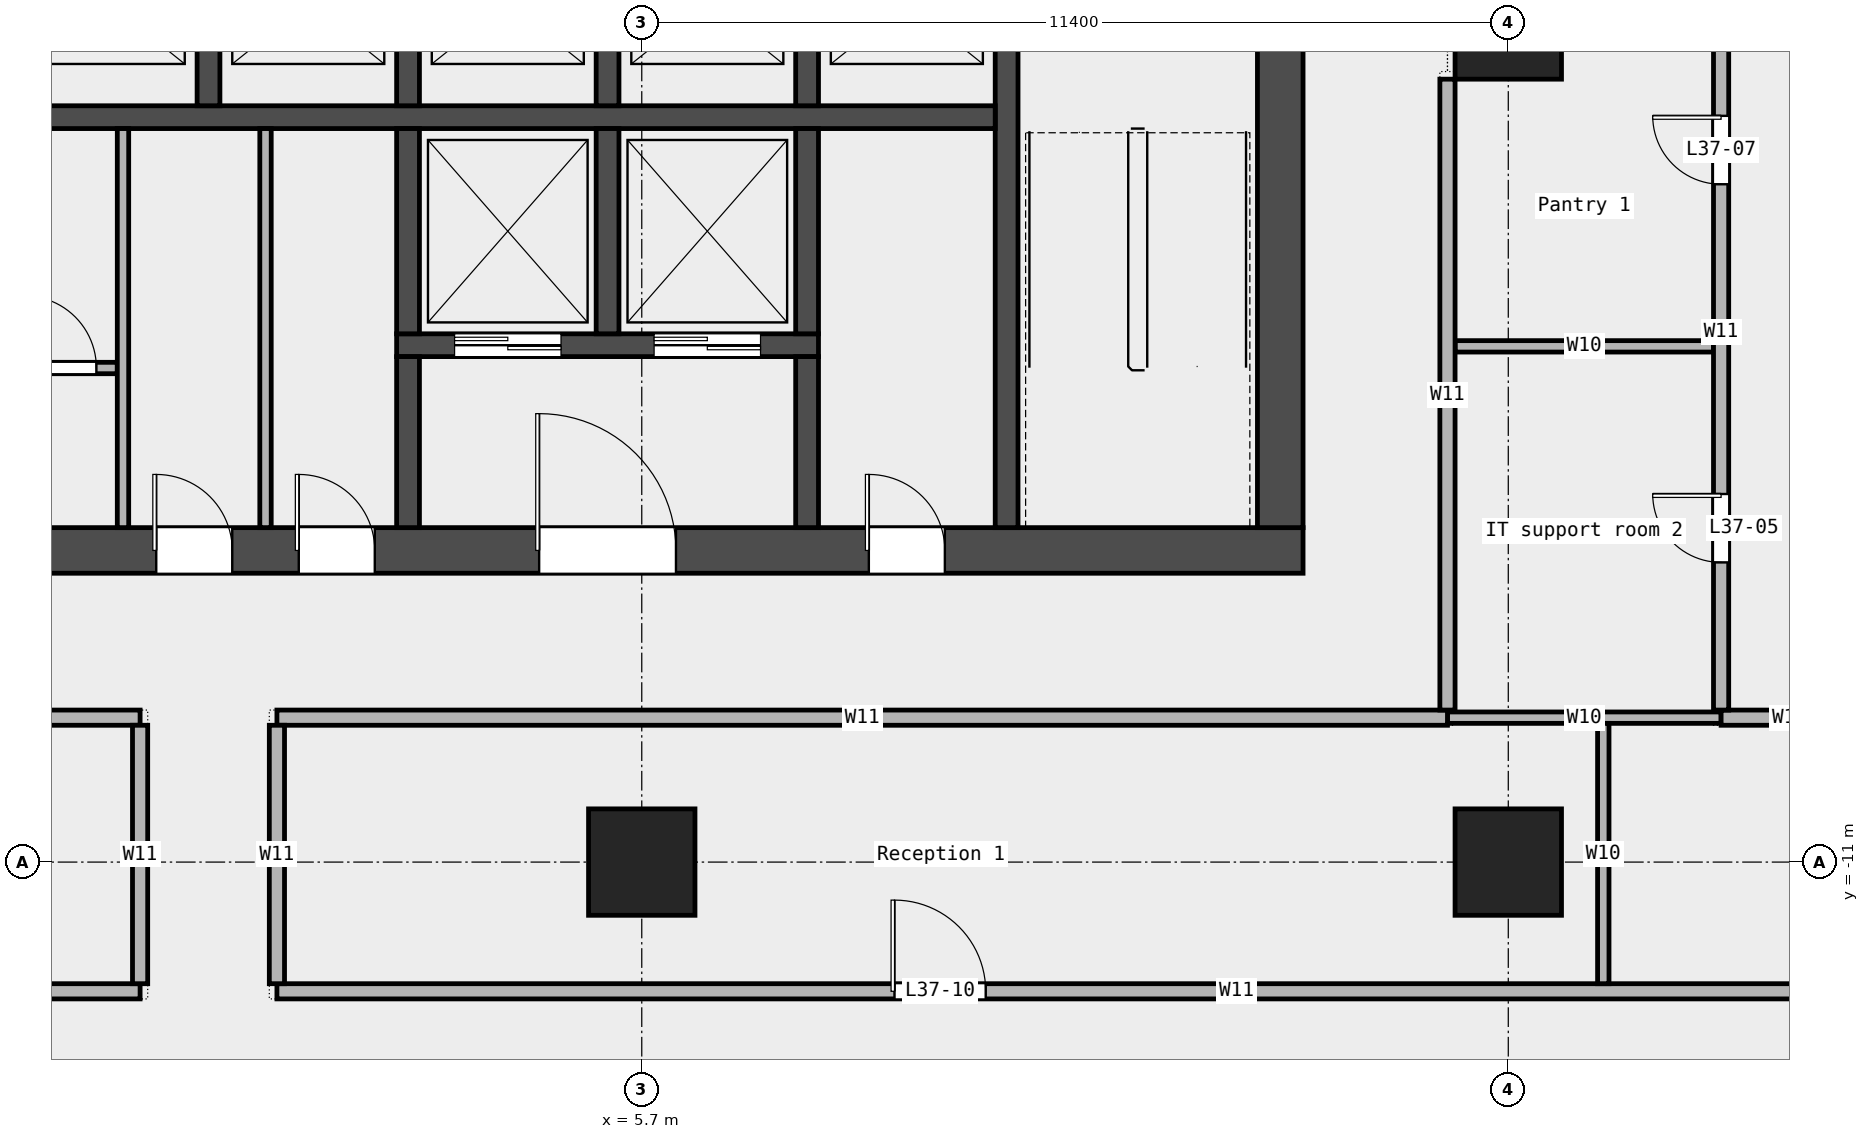
"""IFC4 building model, lengths in metres.
Left out: names, types, materials, properties, quantities, classifications, styles, units other than length and angle.
Written with IfcOpenShell. Run it as: python <this file> out.ifc"""

import sys

from ifc_helpers import new_model, si_unit, direction, frame, frame_2d, origin, origin_2d, place, context, subcontext, project, spatial, rectangle, extrude, element, fill, save


model = new_model("IFC4")
c1 = context("Model", 3, precision=1e-05, world=origin(), true_north=direction((0.0, 1.0)))
c2 = subcontext(c1, "Body", "Model", "MODEL_VIEW")
j1 = project(units=[si_unit("LENGTHUNIT", "METRE"), si_unit("PLANEANGLEUNIT", "RADIAN")], contexts=[c1])
p1 = place(None, origin())
s1 = spatial("IfcSite", under=j1, at=p1, CompositionType="ELEMENT")
p2 = place(p1, origin())
s2 = spatial("IfcBuilding", under=s1, at=p2, CompositionType="ELEMENT")
p3 = place(p2, frame((0.0, 0.0, 181.0)))
s3 = spatial("IfcBuildingStorey", under=s2, at=p3, CompositionType="ELEMENT", Elevation=181.0)
for number, where, z_axis, x_axis in (
    (1, (5.7, -11.0, 0.0), (0.0, 0.0, 1.0), (1.0, 0.0, 0.0)),
    (2, (17.1, -11.0, 0.0), (0.0, 0.0, 1.0), (1.0, 0.0, 0.0)),
    (3, (17.1, 0.0, 0.0), (0.0, 0.0, 1.0), (1.0, 0.0, 0.0)),
):
    element("IfcColumn", number, at=place(p3, frame(where, z_axis=z_axis, x_axis=x_axis)), inside=s3, PredefinedType="COLUMN", context=c2, shape_type="SweptSolid", body=[
        extrude(rectangle(XDim=1.4, YDim=1.4, at=origin_2d()), origin(), (0.0, 0.0, 1.0), 3.6),
    ])
p4 = place(p3, frame((-24.15, -12.7, 0.0), z_axis=(0.0, 0.0, 1.0), x_axis=(1.0, 0.0, 0.0)))
e4 = element("IfcWall", 4, at=p4, inside=s3, PredefinedType="PARTITIONING", context=c2, shape_type="SweptSolid", body=[
    extrude(rectangle(XDim=23.25, YDim=0.2, at=frame_2d((11.625, 0.0))), origin(), (0.0, 0.0, 1.0), 3.6),
])
p5 = place(p4, frame((19.35, 0.0, 0.0)))
e5 = element("IfcOpeningElement", 5, at=p5, cuts=e4, PredefinedType="OPENING", context=c2, shape_type="SweptSolid", body=[
    extrude(rectangle(XDim=0.9, YDim=2.1, at=frame_2d((0.45, 1.05))), frame((0.0, 0.112, 0.0), z_axis=(0.0, -1.0, 0.0), x_axis=(1.0, 0.0, 0.0)), (0.0, 0.0, 1.0), 0.224),
])
p6 = place(p4, frame((7.825, 0.0, 0.0)))
e6 = element("IfcOpeningElement", 6, at=p6, cuts=e4, PredefinedType="OPENING", context=c2, shape_type="SweptSolid", body=[
    extrude(rectangle(XDim=1.5, YDim=2.1, at=frame_2d((0.75, 1.05))), frame((0.0, 0.112, 0.0), z_axis=(0.0, -1.0, 0.0), x_axis=(1.0, 0.0, 0.0)), (0.0, 0.0, 1.0), 0.224),
])
p7 = place(p3, frame((0.9, -12.7, 0.0), z_axis=(0.0, 0.0, 1.0), x_axis=(1.0, 0.0, 0.0)))
e7 = element("IfcWall", 7, at=p7, inside=s3, PredefinedType="PARTITIONING", context=c2, shape_type="SweptSolid", body=[
    extrude(rectangle(XDim=25.25, YDim=0.2, at=frame_2d((12.625, 0.0))), origin(), (0.0, 0.0, 1.0), 3.6),
])
p8 = place(p7, frame((20.75, 0.0, 0.0)))
e8 = element("IfcOpeningElement", 8, at=p8, cuts=e7, PredefinedType="OPENING", context=c2, shape_type="SweptSolid", body=[
    extrude(rectangle(XDim=1.0, YDim=2.1, at=frame_2d((0.5, 1.05))), frame((0.0, 0.112, 0.0), z_axis=(0.0, -1.0, 0.0), x_axis=(1.0, 0.0, 0.0)), (0.0, 0.0, 1.0), 0.224),
])
p9 = place(p7, frame((8.125, 0.0, 0.0)))
e9 = element("IfcOpeningElement", 9, at=p9, cuts=e7, PredefinedType="OPENING", context=c2, shape_type="SweptSolid", body=[
    extrude(rectangle(XDim=1.2, YDim=2.1, at=frame_2d((0.6, 1.05))), frame((0.0, 0.112, 0.0), z_axis=(0.0, -1.0, 0.0), x_axis=(1.0, 0.0, 0.0)), (0.0, 0.0, 1.0), 0.224),
])
p10 = place(p3, frame((16.3, -9.1, 0.0), z_axis=(0.0, 0.0, 1.0), x_axis=(1.0, 0.0, 0.0)))
e10 = element("IfcWall", 10, at=p10, inside=s3, PredefinedType="PARTITIONING", context=c2, shape_type="SweptSolid", body=[
    extrude(rectangle(XDim=3.6, YDim=0.15, at=frame_2d((1.8, 0.0))), origin(), (0.0, 0.0, 1.0), 3.6),
])
for number, where, z_axis, x_axis in (
    (11, (-16.3, -9.1, 0.0), (0.0, 0.0, 1.0), (1.0, 0.0, 0.0)),
    (12, (0.9, -9.1, 0.0), (0.0, 0.0, 1.0), (1.0, 0.0, 0.0)),
):
    element("IfcWall", number, at=place(p3, frame(where, z_axis=z_axis, x_axis=x_axis)), inside=s3, PredefinedType="PARTITIONING", context=c2, shape_type="SweptSolid", body=[
        extrude(rectangle(XDim=15.4, YDim=0.2, at=frame_2d((7.7, 0.0))), origin(), (0.0, 0.0, 1.0), 3.6),
    ])
p11 = place(p3, frame((19.9, -9.1, 0.0), z_axis=(0.0, 0.0, 1.0), x_axis=(1.0, 0.0, 0.0)))
e13 = element("IfcWall", 13, at=p11, inside=s3, PredefinedType="PARTITIONING", context=c2, shape_type="SweptSolid", body=[
    extrude(rectangle(XDim=1.8, YDim=0.2, at=frame_2d((0.9, 0.0))), origin(), (0.0, 0.0, 1.0), 3.6),
])
p12 = place(p3, frame((16.4, -4.215, 0.0), z_axis=(0.0, 0.0, 1.0), x_axis=(1.0, 0.0, 0.0)))
e14 = element("IfcWall", 14, at=p12, inside=s3, PredefinedType="PARTITIONING", context=c2, shape_type="SweptSolid", body=[
    extrude(rectangle(XDim=3.4, YDim=0.15, at=frame_2d((1.7, 0.0))), origin(), (0.0, 0.0, 1.0), 3.6),
])
for number, where, z_axis, x_axis in (
    (15, (-0.9, -12.6, 0.0), (0.0, 0.0, 1.0), (0.0, 1.0, 0.0)),
    (16, (0.9, -12.6, 0.0), (0.0, 0.0, 1.0), (0.0, 1.0, 0.0)),
):
    element("IfcWall", number, at=place(p3, frame(where, z_axis=z_axis, x_axis=x_axis)), inside=s3, PredefinedType="PARTITIONING", context=c2, shape_type="SweptSolid", body=[
        extrude(rectangle(XDim=3.4, YDim=0.2, at=frame_2d((1.7, 0.0))), origin(), (0.0, 0.0, 1.0), 3.6),
    ])
p13 = place(p3, frame((16.3, -9.0, 0.0), z_axis=(0.0, 0.0, 1.0), x_axis=(0.0, 1.0, 0.0)))
e17 = element("IfcWall", 17, at=p13, inside=s3, PredefinedType="PARTITIONING", context=c2, shape_type="SweptSolid", body=[
    extrude(rectangle(XDim=8.3, YDim=0.2, at=frame_2d((4.15, 0.0))), origin(), (0.0, 0.0, 1.0), 3.6),
])
p14 = place(p3, frame((18.35, -12.6, 0.0), z_axis=(0.0, 0.0, 1.0), x_axis=(0.0, 1.0, 0.0)))
e18 = element("IfcWall", 18, at=p14, inside=s3, PredefinedType="PARTITIONING", context=c2, shape_type="SweptSolid", body=[
    extrude(rectangle(XDim=3.425, YDim=0.15, at=frame_2d((1.712, 0.0))), origin(), (0.0, 0.0, 1.0), 3.6),
])
p15 = place(p3, frame((19.9, -9.0, 0.0), z_axis=(0.0, 0.0, 1.0), x_axis=(0.0, 1.0, 0.0)))
e19 = element("IfcWall", 19, at=p15, inside=s3, PredefinedType="PARTITIONING", context=c2, shape_type="SweptSolid", body=[
    extrude(rectangle(XDim=9.95, YDim=0.2, at=frame_2d((4.975, 0.0))), origin(), (0.0, 0.0, 1.0), 3.6),
])
p16 = place(p15, frame((1.942, 0.0, 0.0)))
e20 = element("IfcOpeningElement", 20, at=p16, cuts=e19, PredefinedType="OPENING", context=c2, shape_type="SweptSolid", body=[
    extrude(rectangle(XDim=0.9, YDim=2.1, at=frame_2d((0.45, 1.05))), frame((0.0, 0.112, 0.0), z_axis=(0.0, -1.0, 0.0), x_axis=(1.0, 0.0, 0.0)), (0.0, 0.0, 1.0), 0.224),
])
p17 = place(p15, frame((6.917, 0.0, 0.0)))
e21 = element("IfcOpeningElement", 21, at=p17, cuts=e19, PredefinedType="OPENING", context=c2, shape_type="SweptSolid", body=[
    extrude(rectangle(XDim=0.9, YDim=2.1, at=frame_2d((0.45, 1.05))), frame((0.0, 0.112, 0.0), z_axis=(0.0, -1.0, 0.0), x_axis=(1.0, 0.0, 0.0)), (0.0, 0.0, 1.0), 0.224),
])
p18 = place(p3, frame((-14.4, -6.9, 0.0), z_axis=(0.0, 0.0, 1.0), x_axis=(1.0, 0.0, 0.0)))
e22 = element("IfcWall", 22, at=p18, inside=s3, PredefinedType="SHEAR", context=c2, shape_type="SweptSolid", body=[
    extrude(rectangle(XDim=28.8, YDim=0.6, at=frame_2d((14.4, 0.0))), origin(), (0.0, 0.0, 1.0), 3.7),
])
p19 = place(p18, frame((4.337, 0.0, 0.0)))
e23 = element("IfcOpeningElement", 23, at=p19, cuts=e22, PredefinedType="OPENING", context=c2, shape_type="SweptSolid", body=[
    extrude(rectangle(XDim=1.0, YDim=2.1, at=frame_2d((0.5, 1.05))), frame((0.0, 0.312, 0.0), z_axis=(0.0, -1.0, 0.0), x_axis=(1.0, 0.0, 0.0)), (0.0, 0.0, 1.0), 0.624),
])
p20 = place(p18, frame((8.925, 0.0, 0.0)))
e24 = element("IfcOpeningElement", 24, at=p20, cuts=e22, PredefinedType="OPENING", context=c2, shape_type="SweptSolid", body=[
    extrude(rectangle(XDim=1.2, YDim=2.1, at=frame_2d((0.6, 1.05))), frame((0.0, 0.312, 0.0), z_axis=(0.0, -1.0, 0.0), x_axis=(1.0, 0.0, 0.0)), (0.0, 0.0, 1.0), 0.624),
])
p21 = place(p18, frame((13.712, 0.0, 0.0)))
e25 = element("IfcOpeningElement", 25, at=p21, cuts=e22, PredefinedType="OPENING", context=c2, shape_type="SweptSolid", body=[
    extrude(rectangle(XDim=1.0, YDim=2.1, at=frame_2d((0.5, 1.05))), frame((0.0, 0.312, 0.0), z_axis=(0.0, -1.0, 0.0), x_axis=(1.0, 0.0, 0.0)), (0.0, 0.0, 1.0), 0.624),
])
p22 = place(p18, frame((15.587, 0.0, 0.0)))
e26 = element("IfcOpeningElement", 26, at=p22, cuts=e22, PredefinedType="OPENING", context=c2, shape_type="SweptSolid", body=[
    extrude(rectangle(XDim=1.0, YDim=2.1, at=frame_2d((0.5, 1.05))), frame((0.0, 0.312, 0.0), z_axis=(0.0, -1.0, 0.0), x_axis=(1.0, 0.0, 0.0)), (0.0, 0.0, 1.0), 0.624),
])
p23 = place(p18, frame((18.75, 0.0, 0.0)))
e27 = element("IfcOpeningElement", 27, at=p23, cuts=e22, PredefinedType="OPENING", context=c2, shape_type="SweptSolid", body=[
    extrude(rectangle(XDim=1.8, YDim=2.1, at=frame_2d((0.9, 1.05))), frame((0.0, 0.312, 0.0), z_axis=(0.0, -1.0, 0.0), x_axis=(1.0, 0.0, 0.0)), (0.0, 0.0, 1.0), 0.624),
])
p24 = place(p18, frame((23.087, 0.0, 0.0)))
e28 = element("IfcOpeningElement", 28, at=p24, cuts=e22, PredefinedType="OPENING", context=c2, shape_type="SweptSolid", body=[
    extrude(rectangle(XDim=1.0, YDim=2.1, at=frame_2d((0.5, 1.05))), frame((0.0, 0.312, 0.0), z_axis=(0.0, -1.0, 0.0), x_axis=(1.0, 0.0, 0.0)), (0.0, 0.0, 1.0), 0.624),
])
p25 = place(p3, frame((14.1, -6.6, 0.0), z_axis=(0.0, 0.0, 1.0), x_axis=(0.0, 1.0, 0.0)))
e29 = element("IfcWall", 29, at=p25, inside=s3, PredefinedType="SHEAR", context=c2, shape_type="SweptSolid", body=[
    extrude(rectangle(XDim=19.5, YDim=0.6, at=frame_2d((9.75, 0.0))), origin(), (0.0, 0.0, 1.0), 3.7),
])
p26 = place(p25, frame((9.3, 0.0, 0.0)))
e30 = element("IfcOpeningElement", 30, at=p26, cuts=e29, PredefinedType="OPENING", context=c2, shape_type="SweptSolid", body=[
    extrude(rectangle(XDim=1.8, YDim=2.1, at=frame_2d((0.9, 1.05))), frame((0.0, 0.312, 0.0), z_axis=(0.0, -1.0, 0.0), x_axis=(1.0, 0.0, 0.0)), (0.0, 0.0, 1.0), 0.624),
])
p27 = place(p3, frame((10.5, -6.6, 0.0), z_axis=(0.0, 0.0, 1.0), x_axis=(0.0, 1.0, 0.0)))
e31 = element("IfcWall", 31, at=p27, inside=s3, PredefinedType="SHEAR", context=c2, shape_type="SweptSolid", body=[
    extrude(rectangle(XDim=8.55, YDim=0.3, at=frame_2d((4.275, 0.0))), origin(), (0.0, 0.0, 1.0), 3.7),
])
p28 = place(p3, frame((-10.35, -1.2, 0.0), z_axis=(0.0, 0.0, 1.0), x_axis=(1.0, 0.0, 0.0)))
e32 = element("IfcWall", 32, at=p28, inside=s3, PredefinedType="SOLIDWALL", context=c2, shape_type="SweptSolid", body=[
    extrude(rectangle(XDim=20.7, YDim=0.3, at=frame_2d((10.35, 0.0))), origin(), (0.0, 0.0, 1.0), 3.7),
])
for number, where, z_axis, x_axis in (
    (33, (0.0, -1.05, 0.0), (0.0, 0.0, 1.0), (0.0, 1.0, 0.0)),
    (34, (2.625, -1.05, 0.0), (0.0, 0.0, 1.0), (0.0, 1.0, 0.0)),
    (35, (5.25, -1.05, 0.0), (0.0, 0.0, 1.0), (0.0, 1.0, 0.0)),
    (36, (7.875, -1.05, 0.0), (0.0, 0.0, 1.0), (0.0, 1.0, 0.0)),
):
    element("IfcWall", number, at=place(p3, frame(where, z_axis=z_axis, x_axis=x_axis)), inside=s3, PredefinedType="SOLIDWALL", context=c2, shape_type="SweptSolid", body=[
        extrude(rectangle(XDim=2.7, YDim=0.3, at=frame_2d((1.35, 0.0))), origin(), (0.0, 0.0, 1.0), 3.7),
    ])
p29 = place(p3, frame((2.475, -4.2, 0.0), z_axis=(0.0, 0.0, 1.0), x_axis=(1.0, 0.0, 0.0)))
e37 = element("IfcWall", 37, at=p29, inside=s3, PredefinedType="SOLIDWALL", context=c2, shape_type="SweptSolid", body=[
    extrude(rectangle(XDim=5.55, YDim=0.3, at=frame_2d((2.775, 0.0))), origin(), (0.0, 0.0, 1.0), 3.7),
])
p30 = place(p29, frame((0.762, 0.0, 0.0)))
e38 = element("IfcOpeningElement", 38, at=p30, cuts=e37, PredefinedType="OPENING", context=c2, shape_type="SweptSolid", body=[
    extrude(rectangle(XDim=1.4, YDim=2.1, at=frame_2d((0.7, 1.05))), frame((0.0, 0.162, 0.0), z_axis=(0.0, -1.0, 0.0), x_axis=(1.0, 0.0, 0.0)), (0.0, 0.0, 1.0), 0.324),
])
p31 = place(p29, frame((3.387, 0.0, 0.0)))
e39 = element("IfcOpeningElement", 39, at=p31, cuts=e37, PredefinedType="OPENING", context=c2, shape_type="SweptSolid", body=[
    extrude(rectangle(XDim=1.4, YDim=2.1, at=frame_2d((0.7, 1.05))), frame((0.0, 0.162, 0.0), z_axis=(0.0, -1.0, 0.0), x_axis=(1.0, 0.0, 0.0)), (0.0, 0.0, 1.0), 0.324),
])
p32 = place(p3, frame((2.625, -4.05, 0.0), z_axis=(0.0, 0.0, 1.0), x_axis=(0.0, 1.0, 0.0)))
e40 = element("IfcWall", 40, at=p32, inside=s3, PredefinedType="SOLIDWALL", context=c2, shape_type="SweptSolid", body=[
    extrude(rectangle(XDim=2.7, YDim=0.3, at=frame_2d((1.35, 0.0))), origin(), (0.0, 0.0, 1.0), 3.7),
])
p33 = place(p3, frame((2.625, -6.6, 0.0), z_axis=(0.0, 0.0, 1.0), x_axis=(0.0, 1.0, 0.0)))
e41 = element("IfcWall", 41, at=p33, inside=s3, PredefinedType="SOLIDWALL", context=c2, shape_type="SweptSolid", body=[
    extrude(rectangle(XDim=2.25, YDim=0.3, at=frame_2d((1.125, 0.0))), origin(), (0.0, 0.0, 1.0), 3.7),
])
for number, where, z_axis, x_axis in (
    (42, (5.25, -4.05, 0.0), (0.0, 0.0, 1.0), (0.0, 1.0, 0.0)),
    (43, (7.875, -4.05, 0.0), (0.0, 0.0, 1.0), (0.0, 1.0, 0.0)),
):
    element("IfcWall", number, at=place(p3, frame(where, z_axis=z_axis, x_axis=x_axis)), inside=s3, PredefinedType="SOLIDWALL", context=c2, shape_type="SweptSolid", body=[
        extrude(rectangle(XDim=2.7, YDim=0.3, at=frame_2d((1.35, 0.0))), origin(), (0.0, 0.0, 1.0), 3.7),
    ])
p34 = place(p3, frame((7.875, -6.6, 0.0), z_axis=(0.0, 0.0, 1.0), x_axis=(0.0, 1.0, 0.0)))
e44 = element("IfcWall", 44, at=p34, inside=s3, PredefinedType="SOLIDWALL", context=c2, shape_type="SweptSolid", body=[
    extrude(rectangle(XDim=2.25, YDim=0.3, at=frame_2d((1.125, 0.0))), origin(), (0.0, 0.0, 1.0), 3.7),
])
p35 = place(p3, frame((-8.55, -4.5, 0.0), z_axis=(0.0, 0.0, 1.0), x_axis=(1.0, 0.0, 0.0)))
e45 = element("IfcWall", 45, at=p35, inside=s3, PredefinedType="PARTITIONING", context=c2, shape_type="SweptSolid", body=[
    extrude(rectangle(XDim=7.35, YDim=0.15, at=frame_2d((3.675, 0.0))), origin(), (0.0, 0.0, 1.0), 3.7),
])
p36 = place(p35, frame((0.975, 0.0, 0.0)))
e46 = element("IfcOpeningElement", 46, at=p36, cuts=e45, PredefinedType="OPENING", context=c2, shape_type="SweptSolid", body=[
    extrude(rectangle(XDim=0.9, YDim=2.1, at=frame_2d((0.45, 1.05))), frame((0.0, 0.087, 0.0), z_axis=(0.0, -1.0, 0.0), x_axis=(1.0, 0.0, 0.0)), (0.0, 0.0, 1.0), 0.174),
])
p37 = place(p35, frame((3.9, 0.0, 0.0)))
e47 = element("IfcOpeningElement", 47, at=p37, cuts=e45, PredefinedType="OPENING", context=c2, shape_type="SweptSolid", body=[
    extrude(rectangle(XDim=0.9, YDim=2.1, at=frame_2d((0.45, 1.05))), frame((0.0, 0.087, 0.0), z_axis=(0.0, -1.0, 0.0), x_axis=(1.0, 0.0, 0.0)), (0.0, 0.0, 1.0), 0.174),
])
p38 = place(p35, frame((6.125, 0.0, 0.0)))
e48 = element("IfcOpeningElement", 48, at=p38, cuts=e45, PredefinedType="OPENING", context=c2, shape_type="SweptSolid", body=[
    extrude(rectangle(XDim=0.95, YDim=2.1, at=frame_2d((0.475, 1.05))), frame((0.0, 0.087, 0.0), z_axis=(0.0, -1.0, 0.0), x_axis=(1.0, 0.0, 0.0)), (0.0, 0.0, 1.0), 0.174),
])
for number, where, z_axis, x_axis in (
    (49, (-1.125, -6.6, 0.0), (0.0, 0.0, 1.0), (0.0, 1.0, 0.0)),
    (50, (0.75, -6.6, 0.0), (0.0, 0.0, 1.0), (0.0, 1.0, 0.0)),
):
    element("IfcWall", number, at=place(p3, frame(where, z_axis=z_axis, x_axis=x_axis)), inside=s3, PredefinedType="PARTITIONING", context=c2, shape_type="SweptSolid", body=[
        extrude(rectangle(XDim=5.25, YDim=0.15, at=frame_2d((2.625, 0.0))), origin(), (0.0, 0.0, 1.0), 3.7),
    ])
p39 = place(p16, origin())
e51 = element("IfcDoor", 51, at=p39, inside=s3, OperationType="SINGLE_SWING_RIGHT", PredefinedType="DOOR", context=c2, shape_type="SweptSolid", body=[
    extrude(rectangle(XDim=0.9, YDim=2.1, at=frame_2d((0.45, 1.05))), frame((0.0, 0.025, 0.0), z_axis=(0.0, -1.0, 0.0), x_axis=(1.0, 0.0, 0.0)), (0.0, 0.0, 1.0), 0.05),
])
fill(e20, e51)
p40 = place(p17, origin())
e52 = element("IfcDoor", 52, at=p40, inside=s3, OperationType="SINGLE_SWING_RIGHT", PredefinedType="DOOR", context=c2, shape_type="SweptSolid", body=[
    extrude(rectangle(XDim=0.9, YDim=2.1, at=frame_2d((0.45, 1.05))), frame((0.0, 0.025, 0.0), z_axis=(0.0, -1.0, 0.0), x_axis=(1.0, 0.0, 0.0)), (0.0, 0.0, 1.0), 0.05),
])
fill(e21, e52)
p41 = place(p9, origin())
e53 = element("IfcDoor", 53, at=p41, inside=s3, OperationType="SINGLE_SWING_LEFT", PredefinedType="DOOR", context=c2, shape_type="SweptSolid", body=[
    extrude(rectangle(XDim=1.2, YDim=2.1, at=frame_2d((0.6, 1.05))), frame((0.0, 0.025, 0.0), z_axis=(0.0, -1.0, 0.0), x_axis=(1.0, 0.0, 0.0)), (0.0, 0.0, 1.0), 0.05),
])
fill(e9, e53)
p42 = place(p30, origin())
e54 = element("IfcDoor", 54, at=p42, inside=s3, OperationType="DOUBLE_DOOR_SLIDING", PredefinedType="DOOR", context=c2, shape_type="SweptSolid", body=[
    extrude(rectangle(XDim=1.4, YDim=2.1, at=frame_2d((0.7, 1.05))), frame((0.0, 0.025, 0.0), z_axis=(0.0, -1.0, 0.0), x_axis=(1.0, 0.0, 0.0)), (0.0, 0.0, 1.0), 0.05),
])
fill(e38, e54)
p43 = place(p31, origin())
e55 = element("IfcDoor", 55, at=p43, inside=s3, OperationType="DOUBLE_DOOR_SLIDING", PredefinedType="DOOR", context=c2, shape_type="SweptSolid", body=[
    extrude(rectangle(XDim=1.4, YDim=2.1, at=frame_2d((0.7, 1.05))), frame((0.0, 0.025, 0.0), z_axis=(0.0, -1.0, 0.0), x_axis=(1.0, 0.0, 0.0)), (0.0, 0.0, 1.0), 0.05),
])
fill(e39, e55)
p44 = place(p38, origin())
e56 = element("IfcDoor", 56, at=p44, inside=s3, OperationType="SINGLE_SWING_LEFT", PredefinedType="DOOR", context=c2, shape_type="SweptSolid", body=[
    extrude(rectangle(XDim=0.95, YDim=2.1, at=frame_2d((0.475, 1.05))), frame((0.0, 0.025, 0.0), z_axis=(0.0, -1.0, 0.0), x_axis=(1.0, 0.0, 0.0)), (0.0, 0.0, 1.0), 0.05),
])
fill(e48, e56)
p45 = place(p21, origin())
e57 = element("IfcDoor", 57, at=p45, inside=s3, OperationType="SINGLE_SWING_LEFT", PredefinedType="DOOR", context=c2, shape_type="SweptSolid", body=[
    extrude(rectangle(XDim=1.0, YDim=2.1, at=frame_2d((0.5, 1.05))), frame((0.0, 0.025, 0.0), z_axis=(0.0, -1.0, 0.0), x_axis=(1.0, 0.0, 0.0)), (0.0, 0.0, 1.0), 0.05),
])
fill(e25, e57)
p46 = place(p22, origin())
e58 = element("IfcDoor", 58, at=p46, inside=s3, OperationType="SINGLE_SWING_LEFT", PredefinedType="DOOR", context=c2, shape_type="SweptSolid", body=[
    extrude(rectangle(XDim=1.0, YDim=2.1, at=frame_2d((0.5, 1.05))), frame((0.0, 0.025, 0.0), z_axis=(0.0, -1.0, 0.0), x_axis=(1.0, 0.0, 0.0)), (0.0, 0.0, 1.0), 0.05),
])
fill(e26, e58)
p47 = place(p23, origin())
e59 = element("IfcDoor", 59, at=p47, inside=s3, OperationType="DOUBLE_DOOR_SINGLE_SWING", PredefinedType="DOOR", context=c2, shape_type="SweptSolid", body=[
    extrude(rectangle(XDim=1.8, YDim=2.1, at=frame_2d((0.9, 1.05))), frame((0.0, 0.025, 0.0), z_axis=(0.0, -1.0, 0.0), x_axis=(1.0, 0.0, 0.0)), (0.0, 0.0, 1.0), 0.05),
])
fill(e27, e59)
p48 = place(p24, origin())
e60 = element("IfcDoor", 60, at=p48, inside=s3, OperationType="SINGLE_SWING_LEFT", PredefinedType="DOOR", context=c2, shape_type="SweptSolid", body=[
    extrude(rectangle(XDim=1.0, YDim=2.1, at=frame_2d((0.5, 1.05))), frame((0.0, 0.025, 0.0), z_axis=(0.0, -1.0, 0.0), x_axis=(1.0, 0.0, 0.0)), (0.0, 0.0, 1.0), 0.05),
])
fill(e28, e60)
save(model, sys.argv[1])
